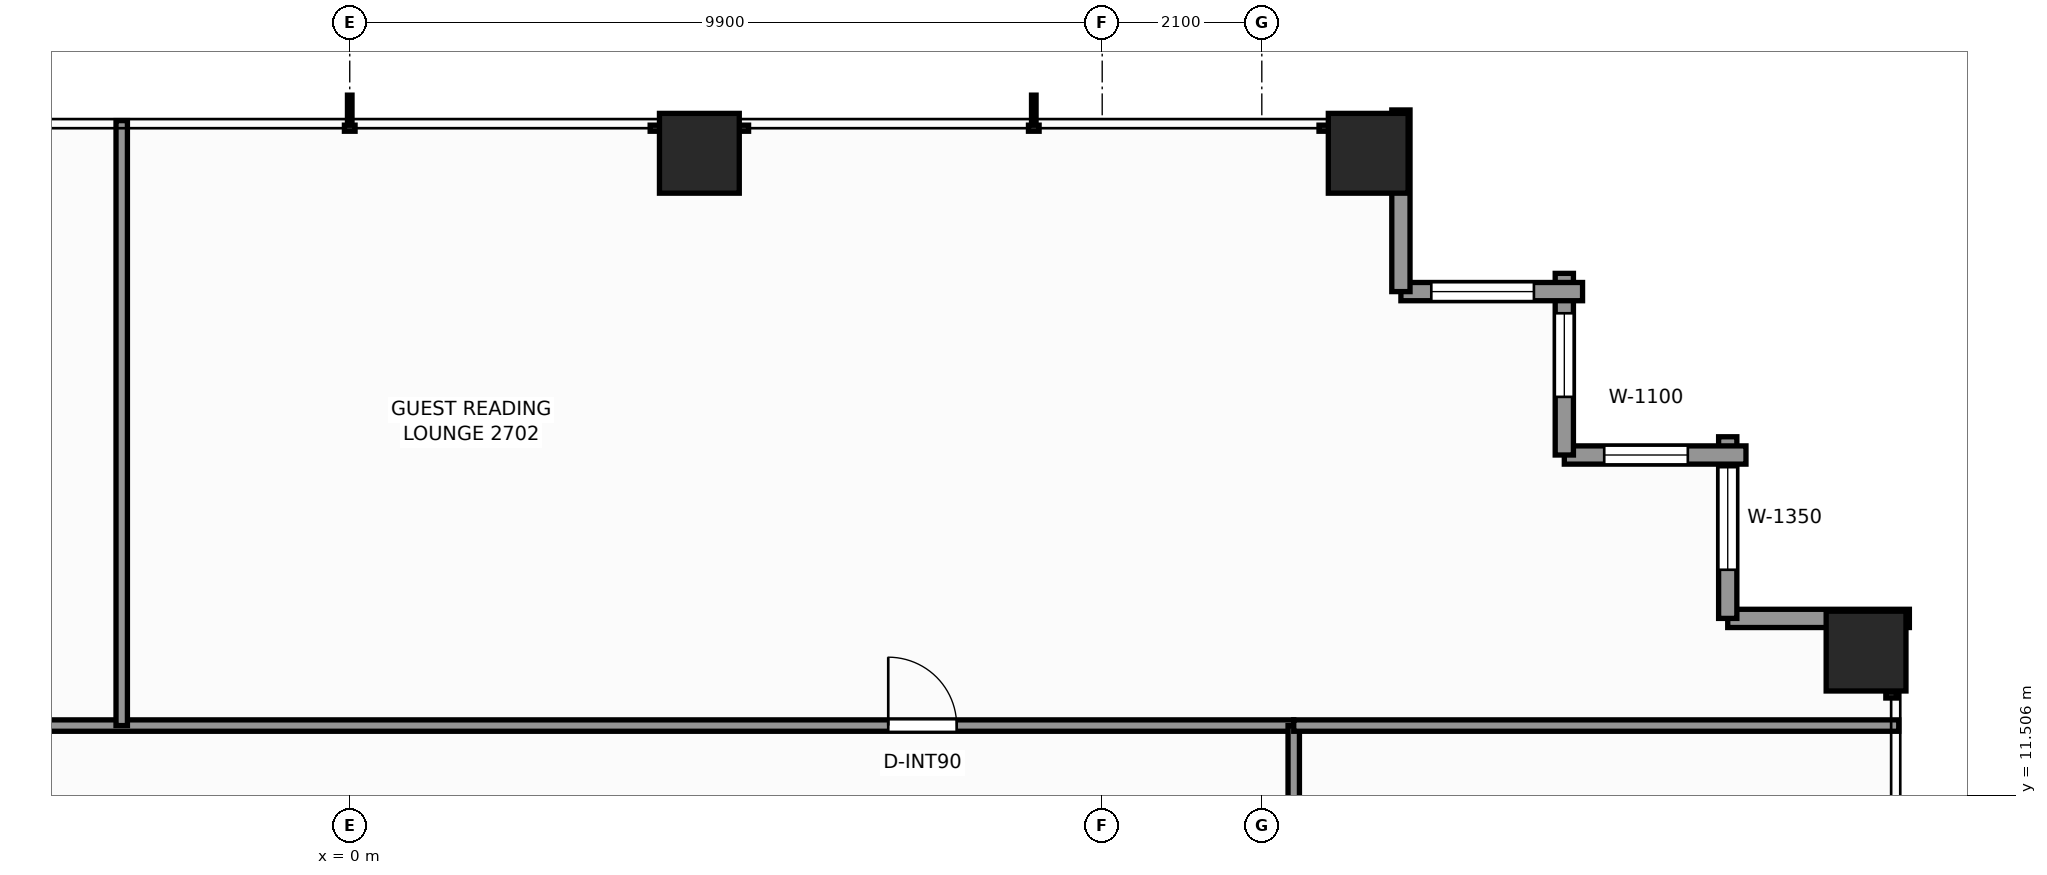
"""IFC4 building model, lengths in metres.
Left out: names, types, materials, properties, quantities, classifications, styles, units other than length and angle.
Written with IfcOpenShell. Run it as: python <this file> out.ifc"""

import sys

from ifc_helpers import new_model, si_unit, direction, frame, frame_2d, origin, origin_2d, place, context, subcontext, project, spatial, rectangle, extrude, element, fill, save


model = new_model("IFC4")
c1 = context("Model", 3, precision=1e-05, world=origin(), true_north=direction((0.0, 1.0)))
c2 = subcontext(c1, "Body", "Model", "MODEL_VIEW")
j1 = project(units=[si_unit("LENGTHUNIT", "METRE"), si_unit("PLANEANGLEUNIT", "RADIAN")], contexts=[c1])
p1 = place(None, origin())
s1 = spatial("IfcSite", under=j1, at=p1, CompositionType="ELEMENT")
p2 = place(p1, origin())
s2 = spatial("IfcBuilding", under=s1, at=p2, CompositionType="ELEMENT")
p3 = place(p2, frame((0.0, 0.0, 95.3)))
s3 = spatial("IfcBuildingStorey", under=s2, at=p3, CompositionType="ELEMENT", Elevation=95.3)
for number, where, z_axis, x_axis in (
    (1, (4.6, 19.95, 0.0), (0.0, 0.0, 1.0), (1.0, 0.0, 0.0)),
    (2, (13.4, 19.95, 0.0), (0.0, 0.0, 1.0), (1.0, 0.0, 0.0)),
    (3, (19.95, 13.4, 0.0), (0.0, 0.0, 1.0), (1.0, 0.0, 0.0)),
):
    element("IfcColumn", number, at=place(p3, frame(where, z_axis=z_axis, x_axis=x_axis)), inside=s3, PredefinedType="COLUMN", context=c2, shape_type="SweptSolid", body=[
        extrude(rectangle(XDim=1.05, YDim=1.05, at=origin_2d()), origin(), (0.0, 0.0, 1.0), 3.3),
    ])
p4 = place(p3, frame((18.13, 13.83, 0.0), z_axis=(0.0, 0.0, 1.0), x_axis=(1.0, 0.0, 0.0)))
e4 = element("IfcWall", 4, at=p4, inside=s3, PredefinedType="STANDARD", context=c2, shape_type="SweptSolid", body=[
    extrude(rectangle(XDim=2.39, YDim=0.24, at=frame_2d((1.195, 0.0))), origin(), (0.0, 0.0, 1.0), 2.459),
])
p5 = place(p3, frame((18.13, 16.22, 0.0), z_axis=(0.0, 0.0, 1.0), x_axis=(0.0, -1.0, 0.0)))
e5 = element("IfcWall", 5, at=p5, inside=s3, PredefinedType="STANDARD", context=c2, shape_type="SweptSolid", body=[
    extrude(rectangle(XDim=2.39, YDim=0.24, at=frame_2d((1.195, 0.0))), origin(), (0.0, 0.0, 1.0), 2.459),
])
p6 = place(p5, frame((0.4, 0.0, 0.65)))
e6 = element("IfcOpeningElement", 6, at=p6, cuts=e5, PredefinedType="OPENING", context=c2, shape_type="SweptSolid", body=[
    extrude(rectangle(XDim=1.35, YDim=1.55, at=frame_2d((0.675, 0.775))), frame((0.0, 0.13, 0.0), z_axis=(0.0, -1.0, 0.0), x_axis=(1.0, 0.0, 0.0)), (0.0, 0.0, 1.0), 0.26),
])
p7 = place(p3, frame((15.98, 15.98, 0.0), z_axis=(0.0, 0.0, 1.0), x_axis=(1.0, 0.0, 0.0)))
e7 = element("IfcWall", 7, at=p7, inside=s3, PredefinedType="STANDARD", context=c2, shape_type="SweptSolid", body=[
    extrude(rectangle(XDim=2.39, YDim=0.24, at=frame_2d((1.195, 0.0))), origin(), (0.0, 0.0, 1.0), 2.459),
])
p8 = place(p7, frame((0.525, 0.0, 0.65)))
e8 = element("IfcOpeningElement", 8, at=p8, cuts=e7, PredefinedType="OPENING", context=c2, shape_type="SweptSolid", body=[
    extrude(rectangle(XDim=1.1, YDim=1.45, at=frame_2d((0.55, 0.725))), frame((0.0, 0.13, 0.0), z_axis=(0.0, -1.0, 0.0), x_axis=(1.0, 0.0, 0.0)), (0.0, 0.0, 1.0), 0.26),
])
p9 = place(p3, frame((15.98, 18.37, 0.0), z_axis=(0.0, 0.0, 1.0), x_axis=(0.0, -1.0, 0.0)))
e9 = element("IfcWall", 9, at=p9, inside=s3, PredefinedType="STANDARD", context=c2, shape_type="SweptSolid", body=[
    extrude(rectangle(XDim=2.39, YDim=0.24, at=frame_2d((1.195, 0.0))), origin(), (0.0, 0.0, 1.0), 2.459),
])
p10 = place(p9, frame((0.525, 0.0, 0.65)))
e10 = element("IfcOpeningElement", 10, at=p10, cuts=e9, PredefinedType="OPENING", context=c2, shape_type="SweptSolid", body=[
    extrude(rectangle(XDim=1.1, YDim=1.45, at=frame_2d((0.55, 0.725))), frame((0.0, 0.13, 0.0), z_axis=(0.0, -1.0, 0.0), x_axis=(1.0, 0.0, 0.0)), (0.0, 0.0, 1.0), 0.26),
])
p11 = place(p3, frame((13.83, 18.13, 0.0), z_axis=(0.0, 0.0, 1.0), x_axis=(1.0, 0.0, 0.0)))
e11 = element("IfcWall", 11, at=p11, inside=s3, PredefinedType="STANDARD", context=c2, shape_type="SweptSolid", body=[
    extrude(rectangle(XDim=2.39, YDim=0.24, at=frame_2d((1.195, 0.0))), origin(), (0.0, 0.0, 1.0), 2.459),
])
p12 = place(p11, frame((0.4, 0.0, 0.65)))
e12 = element("IfcOpeningElement", 12, at=p12, cuts=e11, PredefinedType="OPENING", context=c2, shape_type="SweptSolid", body=[
    extrude(rectangle(XDim=1.35, YDim=1.55, at=frame_2d((0.675, 0.775))), frame((0.0, 0.13, 0.0), z_axis=(0.0, -1.0, 0.0), x_axis=(1.0, 0.0, 0.0)), (0.0, 0.0, 1.0), 0.26),
])
p13 = place(p3, frame((13.83, 20.52, 0.0), z_axis=(0.0, 0.0, 1.0), x_axis=(0.0, -1.0, 0.0)))
e13 = element("IfcWall", 13, at=p13, inside=s3, PredefinedType="STANDARD", context=c2, shape_type="SweptSolid", body=[
    extrude(rectangle(XDim=2.39, YDim=0.24, at=frame_2d((1.195, 0.0))), origin(), (0.0, 0.0, 1.0), 2.459),
])
p14 = place(p3, frame((-12.26, 12.42, 0.0), z_axis=(0.0, 0.0, 1.0), x_axis=(1.0, 0.0, 0.0)))
e14 = element("IfcWall", 14, at=p14, inside=s3, PredefinedType="PARTITIONING", context=c2, shape_type="SweptSolid", body=[
    extrude(rectangle(XDim=24.68, YDim=0.15, at=frame_2d((12.34, 0.0))), origin(), (0.0, 0.0, 1.0), 2.292),
])
p15 = place(p14, frame((4.275, 0.0, 0.0)))
e15 = element("IfcOpeningElement", 15, at=p15, cuts=e14, PredefinedType="OPENING", context=c2, shape_type="SweptSolid", body=[
    extrude(rectangle(XDim=0.9, YDim=2.06, at=frame_2d((0.45, 1.03))), frame((0.0, 0.085, 0.0), z_axis=(0.0, -1.0, 0.0), x_axis=(1.0, 0.0, 0.0)), (0.0, 0.0, 1.0), 0.17),
])
p16 = place(p14, frame((19.345, 0.0, 0.0)))
e16 = element("IfcOpeningElement", 16, at=p16, cuts=e14, PredefinedType="OPENING", context=c2, shape_type="SweptSolid", body=[
    extrude(rectangle(XDim=0.9, YDim=2.06, at=frame_2d((0.45, 1.03))), frame((0.0, 0.085, 0.0), z_axis=(0.0, -1.0, 0.0), x_axis=(1.0, 0.0, 0.0)), (0.0, 0.0, 1.0), 0.17),
])
p17 = place(p3, frame((12.42, -12.42, 0.0), z_axis=(0.0, 0.0, 1.0), x_axis=(0.0, 1.0, 0.0)))
e17 = element("IfcWall", 17, at=p17, inside=s3, PredefinedType="PARTITIONING", context=c2, shape_type="SweptSolid", body=[
    extrude(rectangle(XDim=24.84, YDim=0.15, at=frame_2d((12.42, 0.0))), origin(), (0.0, 0.0, 1.0), 2.292),
])
p18 = place(p17, frame((4.435, 0.0, 0.0)))
e18 = element("IfcOpeningElement", 18, at=p18, cuts=e17, PredefinedType="OPENING", context=c2, shape_type="SweptSolid", body=[
    extrude(rectangle(XDim=0.9, YDim=2.06, at=frame_2d((0.45, 1.03))), frame((0.0, 0.085, 0.0), z_axis=(0.0, -1.0, 0.0), x_axis=(1.0, 0.0, 0.0)), (0.0, 0.0, 1.0), 0.17),
])
p19 = place(p17, frame((19.505, 0.0, 0.0)))
e19 = element("IfcOpeningElement", 19, at=p19, cuts=e17, PredefinedType="OPENING", context=c2, shape_type="SweptSolid", body=[
    extrude(rectangle(XDim=0.9, YDim=2.06, at=frame_2d((0.45, 1.03))), frame((0.0, 0.085, 0.0), z_axis=(0.0, -1.0, 0.0), x_axis=(1.0, 0.0, 0.0)), (0.0, 0.0, 1.0), 0.17),
])
p20 = place(p3, frame((12.42, 12.42, 0.0), z_axis=(0.0, 0.0, 1.0), x_axis=(1.0, 0.0, 0.0)))
e20 = element("IfcWall", 20, at=p20, inside=s3, PredefinedType="PARTITIONING", context=c2, shape_type="SweptSolid", body=[
    extrude(rectangle(XDim=7.96, YDim=0.15, at=frame_2d((3.98, 0.0))), origin(), (0.0, 0.0, 1.0), 2.292),
])
p21 = place(p3, frame((-3.0, 12.42, 0.0), z_axis=(0.0, 0.0, 1.0), x_axis=(0.0, 1.0, 0.0)))
e21 = element("IfcWall", 21, at=p21, inside=s3, PredefinedType="PARTITIONING", context=c2, shape_type="SweptSolid", body=[
    extrude(rectangle(XDim=7.96, YDim=0.15, at=frame_2d((3.98, 0.0))), origin(), (0.0, 0.0, 1.0), 2.369),
])
p22 = place(p6, origin())
e22 = element("IfcWindow", 22, at=p22, inside=s3, PartitioningType="SINGLE_PANEL", PredefinedType="WINDOW", context=c2, shape_type="SweptSolid", body=[
    extrude(rectangle(XDim=1.35, YDim=1.55, at=frame_2d((0.675, 0.775))), frame((0.0, 0.03, 0.0), z_axis=(0.0, -1.0, 0.0), x_axis=(1.0, 0.0, 0.0)), (0.0, 0.0, 1.0), 0.06),
])
fill(e6, e22)
p23 = place(p8, origin())
e23 = element("IfcWindow", 23, at=p23, inside=s3, PartitioningType="SINGLE_PANEL", PredefinedType="WINDOW", context=c2, shape_type="SweptSolid", body=[
    extrude(rectangle(XDim=1.1, YDim=1.45, at=frame_2d((0.55, 0.725))), frame((0.0, 0.03, 0.0), z_axis=(0.0, -1.0, 0.0), x_axis=(1.0, 0.0, 0.0)), (0.0, 0.0, 1.0), 0.06),
])
fill(e8, e23)
p24 = place(p10, origin())
e24 = element("IfcWindow", 24, at=p24, inside=s3, PartitioningType="SINGLE_PANEL", PredefinedType="WINDOW", context=c2, shape_type="SweptSolid", body=[
    extrude(rectangle(XDim=1.1, YDim=1.45, at=frame_2d((0.55, 0.725))), frame((0.0, 0.03, 0.0), z_axis=(0.0, -1.0, 0.0), x_axis=(1.0, 0.0, 0.0)), (0.0, 0.0, 1.0), 0.06),
])
fill(e10, e24)
p25 = place(p12, origin())
e25 = element("IfcWindow", 25, at=p25, inside=s3, PartitioningType="SINGLE_PANEL", PredefinedType="WINDOW", context=c2, shape_type="SweptSolid", body=[
    extrude(rectangle(XDim=1.35, YDim=1.55, at=frame_2d((0.675, 0.775))), frame((0.0, 0.03, 0.0), z_axis=(0.0, -1.0, 0.0), x_axis=(1.0, 0.0, 0.0)), (0.0, 0.0, 1.0), 0.06),
])
fill(e12, e25)
p26 = place(p16, origin())
e26 = element("IfcDoor", 26, at=p26, inside=s3, OperationType="SINGLE_SWING_LEFT", PredefinedType="DOOR", context=c2, shape_type="SweptSolid", body=[
    extrude(rectangle(XDim=0.9, YDim=2.06, at=frame_2d((0.45, 1.03))), frame((0.0, 0.025, 0.0), z_axis=(0.0, -1.0, 0.0), x_axis=(1.0, 0.0, 0.0)), (0.0, 0.0, 1.0), 0.05),
])
fill(e16, e26)
save(model, sys.argv[1])
